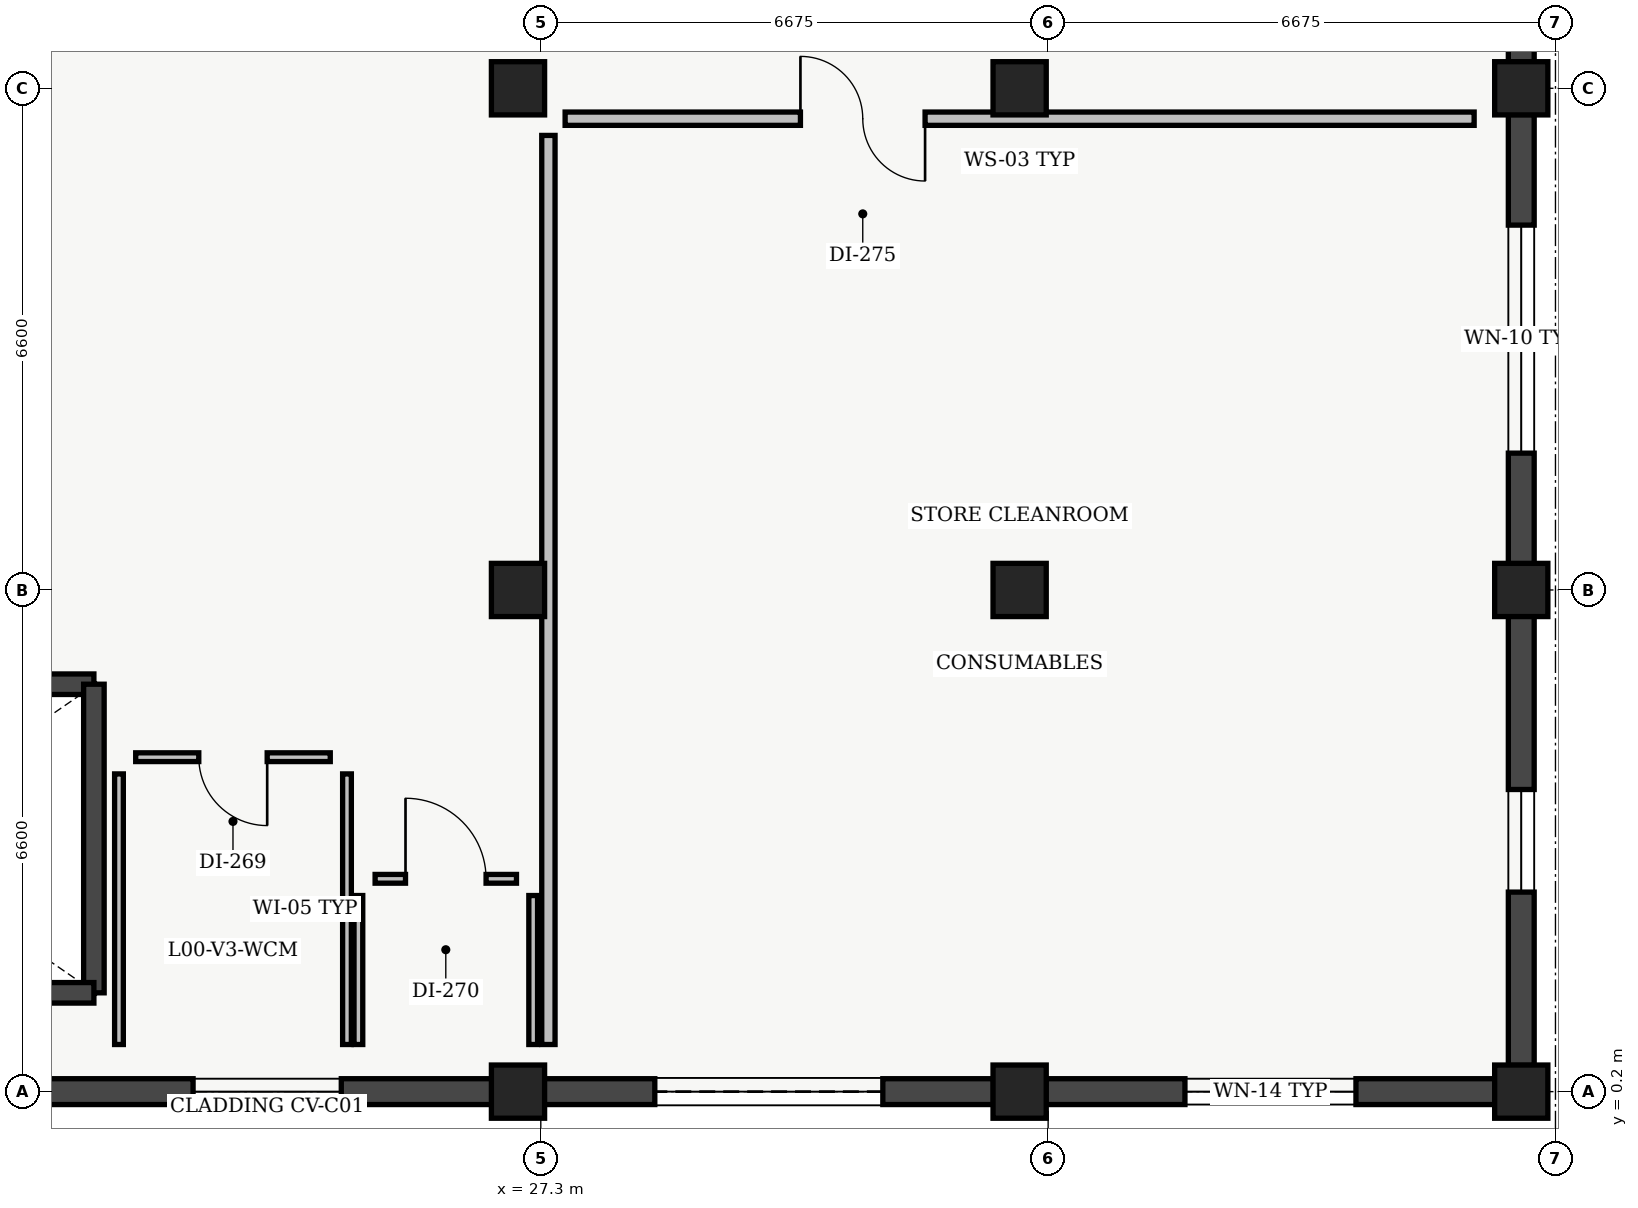
"""IFC4 building model, lengths in metres.
Left out: names, types, materials, properties, quantities, classifications, styles, units other than length and angle.
Written with IfcOpenShell. Run it as: python <this file> out.ifc"""

import sys

from ifc_helpers import new_model, si_unit, direction, frame, frame_2d, origin, origin_2d, place, context, subcontext, project, spatial, rectangle, extrude, element, fill, save


model = new_model("IFC4")
c1 = context("Model", 3, precision=1e-05, world=origin(), true_north=direction((0.0, 1.0)))
c2 = subcontext(c1, "Body", "Model", "MODEL_VIEW")
j1 = project(units=[si_unit("LENGTHUNIT", "METRE"), si_unit("PLANEANGLEUNIT", "RADIAN")], contexts=[c1])
p1 = place(None, origin())
s1 = spatial("IfcSite", under=j1, at=p1, CompositionType="ELEMENT")
p2 = place(p1, origin())
s2 = spatial("IfcBuilding", under=s1, at=p2, CompositionType="ELEMENT")
p3 = place(p2, origin())
s3 = spatial("IfcBuildingStorey", under=s2, at=p3, CompositionType="ELEMENT", Elevation=0.0)
for number, where, z_axis, x_axis in (
    (1, (27.0, 0.2, 0.0), (0.0, 0.0, 1.0), (1.0, 0.0, 0.0)),
    (2, (27.0, 6.8, 0.0), (0.0, 0.0, 1.0), (1.0, 0.0, 0.0)),
    (3, (27.0, 13.4, 0.0), (0.0, 0.0, 1.0), (1.0, 0.0, 0.0)),
    (4, (33.6, 0.2, 0.0), (0.0, 0.0, 1.0), (1.0, 0.0, 0.0)),
    (5, (33.6, 6.8, 0.0), (0.0, 0.0, 1.0), (1.0, 0.0, 0.0)),
    (6, (33.6, 13.4, 0.0), (0.0, 0.0, 1.0), (1.0, 0.0, 0.0)),
    (7, (40.2, 0.2, 0.0), (0.0, 0.0, 1.0), (1.0, 0.0, 0.0)),
    (8, (40.2, 6.8, 0.0), (0.0, 0.0, 1.0), (1.0, 0.0, 0.0)),
    (9, (40.2, 13.4, 0.0), (0.0, 0.0, 1.0), (1.0, 0.0, 0.0)),
):
    element("IfcColumn", number, at=place(p3, frame(where, z_axis=z_axis, x_axis=x_axis)), inside=s3, PredefinedType="COLUMN", context=c2, shape_type="SweptSolid", body=[
        extrude(rectangle(XDim=0.7, YDim=0.7, at=origin_2d()), origin(), (0.0, 0.0, 1.0), 4.88),
    ])
p4 = place(p3, frame((40.2, 19.655, 0.0), z_axis=(0.0, 0.0, 1.0), x_axis=(0.0, -1.0, 0.0)))
e10 = element("IfcWall", 10, at=p4, inside=s3, PredefinedType="SOLIDWALL", context=c2, shape_type="SweptSolid", body=[
    extrude(rectangle(XDim=5.91, YDim=0.34, at=frame_2d((2.955, 0.0))), origin(), (0.0, 0.0, 1.0), 4.415),
])
p5 = place(p4, frame((3.56, 0.0, 0.0)))
e11 = element("IfcOpeningElement", 11, at=p5, cuts=e10, PredefinedType="OPENING", context=c2, shape_type="SweptSolid", body=[
    extrude(rectangle(XDim=2.0, YDim=2.25, at=frame_2d((1.0, 1.125))), frame((0.0, 0.17, 0.0), z_axis=(0.0, -1.0, 0.0), x_axis=(1.0, 0.0, 0.0)), (0.0, 0.0, 1.0), 0.34),
])
p6 = place(p3, frame((40.2, 13.055, 0.0), z_axis=(0.0, 0.0, 1.0), x_axis=(0.0, -1.0, 0.0)))
e12 = element("IfcWall", 12, at=p6, inside=s3, PredefinedType="SOLIDWALL", context=c2, shape_type="SweptSolid", body=[
    extrude(rectangle(XDim=5.91, YDim=0.34, at=frame_2d((2.955, 0.0))), origin(), (0.0, 0.0, 1.0), 4.415),
])
p7 = place(p6, frame((1.455, 0.0, 0.95)))
e13 = element("IfcOpeningElement", 13, at=p7, cuts=e12, PredefinedType="OPENING", context=c2, shape_type="SweptSolid", body=[
    extrude(rectangle(XDim=3.0, YDim=1.65, at=frame_2d((1.5, 0.825))), frame((0.0, 0.17, 0.0), z_axis=(0.0, -1.0, 0.0), x_axis=(1.0, 0.0, 0.0)), (0.0, 0.0, 1.0), 0.34),
])
p8 = place(p3, frame((40.2, 6.455, 0.0), z_axis=(0.0, 0.0, 1.0), x_axis=(0.0, -1.0, 0.0)))
e14 = element("IfcWall", 14, at=p8, inside=s3, PredefinedType="SOLIDWALL", context=c2, shape_type="SweptSolid", body=[
    extrude(rectangle(XDim=5.91, YDim=0.34, at=frame_2d((2.955, 0.0))), origin(), (0.0, 0.0, 1.0), 4.415),
])
p9 = place(p8, frame((2.28, 0.0, 0.95)))
e15 = element("IfcOpeningElement", 15, at=p9, cuts=e14, PredefinedType="OPENING", context=c2, shape_type="SweptSolid", body=[
    extrude(rectangle(XDim=1.35, YDim=1.8, at=frame_2d((0.675, 0.9))), frame((0.0, 0.17, 0.0), z_axis=(0.0, -1.0, 0.0), x_axis=(1.0, 0.0, 0.0)), (0.0, 0.0, 1.0), 0.34),
])
p10 = place(p3, frame((39.855, 0.2, 0.0), z_axis=(0.0, 0.0, 1.0), x_axis=(-1.0, 0.0, 0.0)))
e16 = element("IfcWall", 16, at=p10, inside=s3, PredefinedType="SOLIDWALL", context=c2, shape_type="SweptSolid", body=[
    extrude(rectangle(XDim=5.91, YDim=0.34, at=frame_2d((2.955, 0.0))), origin(), (0.0, 0.0, 1.0), 4.415),
])
p11 = place(p10, frame((1.83, 0.0, 0.95)))
e17 = element("IfcOpeningElement", 17, at=p11, cuts=e16, PredefinedType="OPENING", context=c2, shape_type="SweptSolid", body=[
    extrude(rectangle(XDim=2.25, YDim=1.55, at=frame_2d((1.125, 0.775))), frame((0.0, 0.17, 0.0), z_axis=(0.0, -1.0, 0.0), x_axis=(1.0, 0.0, 0.0)), (0.0, 0.0, 1.0), 0.34),
])
p12 = place(p3, frame((33.255, 0.2, 0.0), z_axis=(0.0, 0.0, 1.0), x_axis=(-1.0, 0.0, 0.0)))
e18 = element("IfcWall", 18, at=p12, inside=s3, PredefinedType="SOLIDWALL", context=c2, shape_type="SweptSolid", body=[
    extrude(rectangle(XDim=5.91, YDim=0.34, at=frame_2d((2.955, 0.0))), origin(), (0.0, 0.0, 1.0), 4.415),
])
p13 = place(p12, frame((1.455, 0.0, 0.0)))
e19 = element("IfcOpeningElement", 19, at=p13, cuts=e18, PredefinedType="OPENING", context=c2, shape_type="SweptSolid", body=[
    extrude(rectangle(XDim=3.0, YDim=2.65, at=frame_2d((1.5, 1.325))), frame((0.0, 0.17, 0.0), z_axis=(0.0, -1.0, 0.0), x_axis=(1.0, 0.0, 0.0)), (0.0, 0.0, 1.0), 0.34),
])
p14 = place(p3, frame((26.655, 0.2, 0.0), z_axis=(0.0, 0.0, 1.0), x_axis=(-1.0, 0.0, 0.0)))
e20 = element("IfcWall", 20, at=p14, inside=s3, PredefinedType="SOLIDWALL", context=c2, shape_type="SweptSolid", body=[
    extrude(rectangle(XDim=5.91, YDim=0.34, at=frame_2d((2.955, 0.0))), origin(), (0.0, 0.0, 1.0), 4.415),
])
p15 = place(p14, frame((1.98, 0.0, 0.95)))
e21 = element("IfcOpeningElement", 21, at=p15, cuts=e20, PredefinedType="OPENING", context=c2, shape_type="SweptSolid", body=[
    extrude(rectangle(XDim=1.95, YDim=1.5, at=frame_2d((0.975, 0.75))), frame((0.0, 0.17, 0.0), z_axis=(0.0, -1.0, 0.0), x_axis=(1.0, 0.0, 0.0)), (0.0, 0.0, 1.0), 0.34),
])
p16 = place(p3, frame((13.95, 5.56, 0.0), z_axis=(0.0, 0.0, 1.0), x_axis=(1.0, 0.0, 0.0)))
e22 = element("IfcWall", 22, at=p16, inside=s3, PredefinedType="SHEAR", context=c2, shape_type="SweptSolid", body=[
    extrude(rectangle(XDim=7.47, YDim=0.27, at=frame_2d((3.735, 0.0))), origin(), (0.0, 0.0, 1.0), 4.88),
])
p17 = place(p16, frame((0.18, 0.0, 0.0)))
e23 = element("IfcOpeningElement", 23, at=p17, cuts=e22, PredefinedType="OPENING", context=c2, shape_type="SweptSolid", body=[
    extrude(rectangle(XDim=1.18, YDim=2.15, at=frame_2d((0.59, 1.075))), frame((0.0, 0.135, 0.0), z_axis=(0.0, -1.0, 0.0), x_axis=(1.0, 0.0, 0.0)), (0.0, 0.0, 1.0), 0.27),
])
p18 = place(p3, frame((21.42, 5.56, 0.0), z_axis=(0.0, 0.0, 1.0), x_axis=(0.0, -1.0, 0.0)))
e24 = element("IfcWall", 24, at=p18, inside=s3, PredefinedType="SHEAR", context=c2, shape_type="SweptSolid", body=[
    extrude(rectangle(XDim=4.06, YDim=0.27, at=frame_2d((2.03, 0.0))), origin(), (0.0, 0.0, 1.0), 4.88),
])
p19 = place(p3, frame((21.42, 1.5, 0.0), z_axis=(0.0, 0.0, 1.0), x_axis=(-1.0, 0.0, 0.0)))
e25 = element("IfcWall", 25, at=p19, inside=s3, PredefinedType="SHEAR", context=c2, shape_type="SweptSolid", body=[
    extrude(rectangle(XDim=7.47, YDim=0.27, at=frame_2d((3.735, 0.0))), origin(), (0.0, 0.0, 1.0), 4.88),
])
p20 = place(p3, frame((24.75, 0.82, 0.0), z_axis=(0.0, 0.0, 1.0), x_axis=(0.0, 1.0, 0.0)))
e26 = element("IfcWall", 26, at=p20, inside=s3, PredefinedType="PARTITIONING", context=c2, shape_type="SweptSolid", body=[
    extrude(rectangle(XDim=3.56, YDim=0.115, at=frame_2d((1.78, 0.0))), origin(), (0.0, 0.0, 1.0), 4.55),
])
p21 = place(p3, frame((24.53, 4.6, 0.0), z_axis=(0.0, 0.0, 1.0), x_axis=(-1.0, 0.0, 0.0)))
e27 = element("IfcWall", 27, at=p21, inside=s3, PredefinedType="PARTITIONING", context=c2, shape_type="SweptSolid", body=[
    extrude(rectangle(XDim=2.56, YDim=0.115, at=frame_2d((1.28, 0.0))), origin(), (0.0, 0.0, 1.0), 4.55),
])
p22 = place(p21, frame((0.83, 0.0, 0.0)))
e28 = element("IfcOpeningElement", 28, at=p22, cuts=e27, PredefinedType="OPENING", context=c2, shape_type="SweptSolid", body=[
    extrude(rectangle(XDim=0.9, YDim=2.1, at=frame_2d((0.45, 1.05))), frame((0.0, 0.058, 0.0), z_axis=(0.0, -1.0, 0.0), x_axis=(1.0, 0.0, 0.0)), (0.0, 0.0, 1.0), 0.115),
])
p23 = place(p3, frame((21.75, 4.38, 0.0), z_axis=(0.0, 0.0, 1.0), x_axis=(0.0, -1.0, 0.0)))
e29 = element("IfcWall", 29, at=p23, inside=s3, PredefinedType="PARTITIONING", context=c2, shape_type="SweptSolid", body=[
    extrude(rectangle(XDim=3.56, YDim=0.115, at=frame_2d((1.78, 0.0))), origin(), (0.0, 0.0, 1.0), 4.55),
])
p24 = place(p3, frame((27.2, 0.82, 0.0), z_axis=(0.0, 0.0, 1.0), x_axis=(0.0, 1.0, 0.0)))
e30 = element("IfcWall", 30, at=p24, inside=s3, PredefinedType="PARTITIONING", context=c2, shape_type="SweptSolid", body=[
    extrude(rectangle(XDim=1.96, YDim=0.115, at=frame_2d((0.98, 0.0))), origin(), (0.0, 0.0, 1.0), 4.215),
])
p25 = place(p3, frame((26.98, 3.0, 0.0), z_axis=(0.0, 0.0, 1.0), x_axis=(-1.0, 0.0, 0.0)))
e31 = element("IfcWall", 31, at=p25, inside=s3, PredefinedType="PARTITIONING", context=c2, shape_type="SweptSolid", body=[
    extrude(rectangle(XDim=1.86, YDim=0.115, at=frame_2d((0.93, 0.0))), origin(), (0.0, 0.0, 1.0), 4.55),
])
p26 = place(p25, frame((0.4, 0.0, 0.0)))
e32 = element("IfcOpeningElement", 32, at=p26, cuts=e31, PredefinedType="OPENING", context=c2, shape_type="SweptSolid", body=[
    extrude(rectangle(XDim=1.06, YDim=2.12, at=frame_2d((0.53, 1.06))), frame((0.0, 0.058, 0.0), z_axis=(0.0, -1.0, 0.0), x_axis=(1.0, 0.0, 0.0)), (0.0, 0.0, 1.0), 0.115),
])
p27 = place(p3, frame((24.9, 2.78, 0.0), z_axis=(0.0, 0.0, 1.0), x_axis=(0.0, -1.0, 0.0)))
e33 = element("IfcWall", 33, at=p27, inside=s3, PredefinedType="PARTITIONING", context=c2, shape_type="SweptSolid", body=[
    extrude(rectangle(XDim=1.96, YDim=0.115, at=frame_2d((0.98, 0.0))), origin(), (0.0, 0.0, 1.0), 4.55),
])
p28 = place(p3, frame((39.58, 13.0, 0.0), z_axis=(0.0, 0.0, 1.0), x_axis=(-1.0, 0.0, 0.0)))
e34 = element("IfcWall", 34, at=p28, inside=s3, PredefinedType="SOLIDWALL", context=c2, shape_type="SweptSolid", body=[
    extrude(rectangle(XDim=11.96, YDim=0.175, at=frame_2d((5.98, 0.0))), origin(), (0.0, 0.0, 1.0), 4.55),
])
p29 = place(p28, frame((7.224, 0.0, 0.0)))
e35 = element("IfcOpeningElement", 35, at=p29, cuts=e34, PredefinedType="OPENING", context=c2, shape_type="SweptSolid", body=[
    extrude(rectangle(XDim=1.64, YDim=2.2, at=frame_2d((0.82, 1.1))), frame((0.0, 0.087, 0.0), z_axis=(0.0, -1.0, 0.0), x_axis=(1.0, 0.0, 0.0)), (0.0, 0.0, 1.0), 0.175),
])
p30 = place(p3, frame((27.4, 12.78, 0.0), z_axis=(0.0, 0.0, 1.0), x_axis=(0.0, -1.0, 0.0)))
e36 = element("IfcWall", 36, at=p30, inside=s3, PredefinedType="SOLIDWALL", context=c2, shape_type="SweptSolid", body=[
    extrude(rectangle(XDim=11.96, YDim=0.175, at=frame_2d((5.98, 0.0))), origin(), (0.0, 0.0, 1.0), 4.55),
])
p31 = place(p7, origin())
e37 = element("IfcWindow", 37, at=p31, inside=s3, PartitioningType="SINGLE_PANEL", PredefinedType="WINDOW", context=c2, shape_type="SweptSolid", body=[
    extrude(rectangle(XDim=3.0, YDim=1.65, at=frame_2d((1.5, 0.825))), frame((0.0, 0.03, 0.0), z_axis=(0.0, -1.0, 0.0), x_axis=(1.0, 0.0, 0.0)), (0.0, 0.0, 1.0), 0.06),
])
fill(e13, e37)
p32 = place(p9, origin())
e38 = element("IfcWindow", 38, at=p32, inside=s3, PartitioningType="SINGLE_PANEL", PredefinedType="WINDOW", context=c2, shape_type="SweptSolid", body=[
    extrude(rectangle(XDim=1.35, YDim=1.8, at=frame_2d((0.675, 0.9))), frame((0.0, 0.03, 0.0), z_axis=(0.0, -1.0, 0.0), x_axis=(1.0, 0.0, 0.0)), (0.0, 0.0, 1.0), 0.06),
])
fill(e15, e38)
p33 = place(p11, origin())
e39 = element("IfcWindow", 39, at=p33, inside=s3, PartitioningType="SINGLE_PANEL", PredefinedType="WINDOW", context=c2, shape_type="SweptSolid", body=[
    extrude(rectangle(XDim=2.25, YDim=1.55, at=frame_2d((1.125, 0.775))), frame((0.0, 0.03, 0.0), z_axis=(0.0, -1.0, 0.0), x_axis=(1.0, 0.0, 0.0)), (0.0, 0.0, 1.0), 0.06),
])
fill(e17, e39)
p34 = place(p13, origin())
e40 = element("IfcDoor", 40, at=p34, inside=s3, OperationType="ROLLINGUP", PredefinedType="GATE", context=c2, shape_type="SweptSolid", body=[
    extrude(rectangle(XDim=3.0, YDim=2.65, at=frame_2d((1.5, 1.325))), frame((0.0, 0.025, 0.0), z_axis=(0.0, -1.0, 0.0), x_axis=(1.0, 0.0, 0.0)), (0.0, 0.0, 1.0), 0.05),
])
fill(e19, e40)
p35 = place(p15, origin())
e41 = element("IfcWindow", 41, at=p35, inside=s3, PartitioningType="SINGLE_PANEL", PredefinedType="WINDOW", context=c2, shape_type="SweptSolid", body=[
    extrude(rectangle(XDim=1.95, YDim=1.5, at=frame_2d((0.975, 0.75))), frame((0.0, 0.03, 0.0), z_axis=(0.0, -1.0, 0.0), x_axis=(1.0, 0.0, 0.0)), (0.0, 0.0, 1.0), 0.06),
])
fill(e21, e41)
p36 = place(p22, origin())
e42 = element("IfcDoor", 42, at=p36, inside=s3, OperationType="SINGLE_SWING_LEFT", PredefinedType="DOOR", context=c2, shape_type="SweptSolid", body=[
    extrude(rectangle(XDim=0.9, YDim=2.1, at=frame_2d((0.45, 1.05))), frame((0.0, 0.025, 0.0), z_axis=(0.0, -1.0, 0.0), x_axis=(1.0, 0.0, 0.0)), (0.0, 0.0, 1.0), 0.05),
])
fill(e28, e42)
p37 = place(p26, origin())
e43 = element("IfcDoor", 43, at=p37, inside=s3, OperationType="SINGLE_SWING_RIGHT", PredefinedType="DOOR", context=c2, shape_type="SweptSolid", body=[
    extrude(rectangle(XDim=1.06, YDim=2.12, at=frame_2d((0.53, 1.06))), frame((0.0, 0.025, 0.0), z_axis=(0.0, -1.0, 0.0), x_axis=(1.0, 0.0, 0.0)), (0.0, 0.0, 1.0), 0.05),
])
fill(e32, e43)
p38 = place(p29, origin())
e44 = element("IfcDoor", 44, at=p38, inside=s3, OperationType="DOUBLE_DOOR_SINGLE_SWING", PredefinedType="DOOR", context=c2, shape_type="SweptSolid", body=[
    extrude(rectangle(XDim=1.64, YDim=2.2, at=frame_2d((0.82, 1.1))), frame((0.0, 0.025, 0.0), z_axis=(0.0, -1.0, 0.0), x_axis=(1.0, 0.0, 0.0)), (0.0, 0.0, 1.0), 0.05),
])
fill(e35, e44)
save(model, sys.argv[1])
